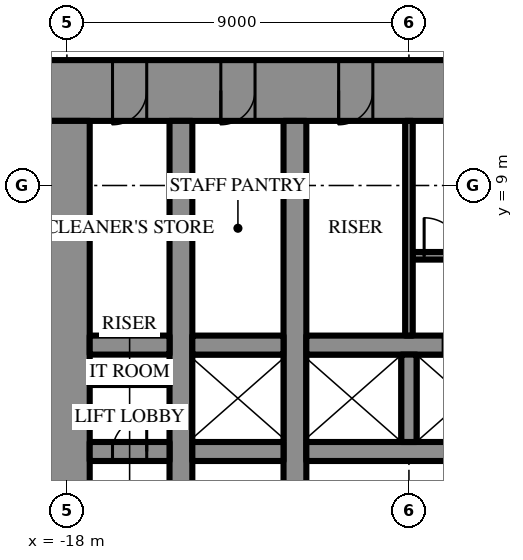
"""IFC4 building model, lengths in metres.
Left out: names, types, materials, properties, quantities, classifications, styles, units other than length and angle.
Written with IfcOpenShell. Run it as: python <this file> out.ifc"""

import sys

from ifc_helpers import new_model, si_unit, direction, frame, frame_2d, origin, place, context, subcontext, project, spatial, rectangle, extrude, element, fill, save


model = new_model("IFC4")
c1 = context("Model", 3, precision=1e-05, world=origin(), true_north=direction((0.0, 1.0)))
c2 = subcontext(c1, "Body", "Model", "MODEL_VIEW")
j1 = project(units=[si_unit("LENGTHUNIT", "METRE"), si_unit("PLANEANGLEUNIT", "RADIAN")], contexts=[c1])
p1 = place(None, origin())
s1 = spatial("IfcSite", under=j1, at=p1, CompositionType="ELEMENT")
p2 = place(p1, origin())
s2 = spatial("IfcBuilding", under=s1, at=p2, CompositionType="ELEMENT")
p3 = place(p2, frame((0.0, 0.0, 178.3)))
s3 = spatial("IfcBuildingStorey", under=s2, at=p3, CompositionType="ELEMENT", Elevation=178.3)
p4 = place(p3, frame((-18.6, 11.5, 0.0), z_axis=(0.0, 0.0, 1.0), x_axis=(1.0, 0.0, 0.0)))
e1 = element("IfcWall", 1, at=p4, inside=s3, PredefinedType="SHEAR", context=c2, shape_type="SweptSolid", body=[
    extrude(rectangle(XDim=37.2, YDim=1.6, at=frame_2d((18.6, 0.0))), origin(), (0.0, 0.0, 1.0), 4.2),
])
p5 = place(p4, frame((19.45, 0.0, 0.0)))
e2 = element("IfcOpeningElement", 2, at=p5, cuts=e1, PredefinedType="OPENING", context=c2, shape_type="SweptSolid", body=[
    extrude(rectangle(XDim=0.9, YDim=2.2, at=frame_2d((0.45, 1.1))), frame((0.0, 0.81, 0.0), z_axis=(0.0, -1.0, 0.0), x_axis=(1.0, 0.0, 0.0)), (0.0, 0.0, 1.0), 1.62),
])
p6 = place(p4, frame((22.45, 0.0, 0.0)))
e3 = element("IfcOpeningElement", 3, at=p6, cuts=e1, PredefinedType="OPENING", context=c2, shape_type="SweptSolid", body=[
    extrude(rectangle(XDim=0.9, YDim=2.2, at=frame_2d((0.45, 1.1))), frame((0.0, 0.81, 0.0), z_axis=(0.0, -1.0, 0.0), x_axis=(1.0, 0.0, 0.0)), (0.0, 0.0, 1.0), 1.62),
])
p7 = place(p4, frame((25.5, 0.0, 0.0)))
e4 = element("IfcOpeningElement", 4, at=p7, cuts=e1, PredefinedType="OPENING", context=c2, shape_type="SweptSolid", body=[
    extrude(rectangle(XDim=1.0, YDim=2.2, at=frame_2d((0.5, 1.1))), frame((0.0, 0.81, 0.0), z_axis=(0.0, -1.0, 0.0), x_axis=(1.0, 0.0, 0.0)), (0.0, 0.0, 1.0), 1.62),
])
p8 = place(p4, frame((1.8, 0.0, 0.0)))
e5 = element("IfcOpeningElement", 5, at=p8, cuts=e1, PredefinedType="OPENING", context=c2, shape_type="SweptSolid", body=[
    extrude(rectangle(XDim=0.9, YDim=2.2, at=frame_2d((0.45, 1.1))), frame((0.0, 0.81, 0.0), z_axis=(0.0, -1.0, 0.0), x_axis=(1.0, 0.0, 0.0)), (0.0, 0.0, 1.0), 1.62),
])
p9 = place(p4, frame((4.65, 0.0, 0.0)))
e6 = element("IfcOpeningElement", 6, at=p9, cuts=e1, PredefinedType="OPENING", context=c2, shape_type="SweptSolid", body=[
    extrude(rectangle(XDim=0.9, YDim=2.2, at=frame_2d((0.45, 1.1))), frame((0.0, 0.81, 0.0), z_axis=(0.0, -1.0, 0.0), x_axis=(1.0, 0.0, 0.0)), (0.0, 0.0, 1.0), 1.62),
])
p10 = place(p4, frame((7.75, 0.0, 0.0)))
e7 = element("IfcOpeningElement", 7, at=p10, cuts=e1, PredefinedType="OPENING", context=c2, shape_type="SweptSolid", body=[
    extrude(rectangle(XDim=0.9, YDim=2.2, at=frame_2d((0.45, 1.1))), frame((0.0, 0.81, 0.0), z_axis=(0.0, -1.0, 0.0), x_axis=(1.0, 0.0, 0.0)), (0.0, 0.0, 1.0), 1.62),
])
p11 = place(p4, frame((28.55, 0.0, 0.0)))
e8 = element("IfcOpeningElement", 8, at=p11, cuts=e1, PredefinedType="OPENING", context=c2, shape_type="SweptSolid", body=[
    extrude(rectangle(XDim=0.9, YDim=2.2, at=frame_2d((0.45, 1.1))), frame((0.0, 0.81, 0.0), z_axis=(0.0, -1.0, 0.0), x_axis=(1.0, 0.0, 0.0)), (0.0, 0.0, 1.0), 1.62),
])
p12 = place(p4, frame((31.65, 0.0, 0.0)))
e9 = element("IfcOpeningElement", 9, at=p12, cuts=e1, PredefinedType="OPENING", context=c2, shape_type="SweptSolid", body=[
    extrude(rectangle(XDim=0.9, YDim=2.2, at=frame_2d((0.45, 1.1))), frame((0.0, 0.81, 0.0), z_axis=(0.0, -1.0, 0.0), x_axis=(1.0, 0.0, 0.0)), (0.0, 0.0, 1.0), 1.62),
])
p13 = place(p4, frame((34.5, 0.0, 0.0)))
e10 = element("IfcOpeningElement", 10, at=p13, cuts=e1, PredefinedType="OPENING", context=c2, shape_type="SweptSolid", body=[
    extrude(rectangle(XDim=0.9, YDim=2.2, at=frame_2d((0.45, 1.1))), frame((0.0, 0.81, 0.0), z_axis=(0.0, -1.0, 0.0), x_axis=(1.0, 0.0, 0.0)), (0.0, 0.0, 1.0), 1.62),
])
p14 = place(p3, frame((-18.0, 10.7, 0.0), z_axis=(0.0, 0.0, 1.0), x_axis=(0.0, -1.0, 0.0)))
e11 = element("IfcWall", 11, at=p14, inside=s3, PredefinedType="SHEAR", context=c2, shape_type="SweptSolid", body=[
    extrude(rectangle(XDim=21.4, YDim=1.2, at=frame_2d((10.7, 0.0))), origin(), (0.0, 0.0, 1.0), 4.2),
])
p15 = place(p14, frame((9.8, 0.0, 0.0)))
e12 = element("IfcOpeningElement", 12, at=p15, cuts=e11, PredefinedType="OPENING", context=c2, shape_type="SweptSolid", body=[
    extrude(rectangle(XDim=1.8, YDim=2.4, at=frame_2d((0.9, 1.2))), frame((0.0, 0.61, 0.0), z_axis=(0.0, -1.0, 0.0), x_axis=(1.0, 0.0, 0.0)), (0.0, 0.0, 1.0), 1.22),
])
p16 = place(p3, frame((-12.0, -10.7, 0.0), z_axis=(0.0, 0.0, 1.0), x_axis=(0.0, 1.0, 0.0)))
e13 = element("IfcWall", 13, at=p16, inside=s3, PredefinedType="SHEAR", context=c2, shape_type="SweptSolid", body=[
    extrude(rectangle(XDim=21.4, YDim=0.6, at=frame_2d((10.7, 0.0))), origin(), (0.0, 0.0, 1.0), 4.2),
])
p17 = place(p16, frame((9.8, 0.0, 0.0)))
e14 = element("IfcOpeningElement", 14, at=p17, cuts=e13, PredefinedType="OPENING", context=c2, shape_type="SweptSolid", body=[
    extrude(rectangle(XDim=1.8, YDim=2.4, at=frame_2d((0.9, 1.2))), frame((0.0, 0.31, 0.0), z_axis=(0.0, -1.0, 0.0), x_axis=(1.0, 0.0, 0.0)), (0.0, 0.0, 1.0), 0.62),
])
p18 = place(p3, frame((-15.0, -10.7, 0.0), z_axis=(0.0, 0.0, 1.0), x_axis=(0.0, 1.0, 0.0)))
e15 = element("IfcWall", 15, at=p18, inside=s3, PredefinedType="SHEAR", context=c2, shape_type="SweptSolid", body=[
    extrude(rectangle(XDim=21.4, YDim=0.6, at=frame_2d((10.7, 0.0))), origin(), (0.0, 0.0, 1.0), 4.2),
])
p19 = place(p18, frame((9.8, 0.0, 0.0)))
e16 = element("IfcOpeningElement", 16, at=p19, cuts=e15, PredefinedType="OPENING", context=c2, shape_type="SweptSolid", body=[
    extrude(rectangle(XDim=1.8, YDim=2.4, at=frame_2d((0.9, 1.2))), frame((0.0, 0.31, 0.0), z_axis=(0.0, -1.0, 0.0), x_axis=(1.0, 0.0, 0.0)), (0.0, 0.0, 1.0), 0.62),
])
p20 = place(p3, frame((-17.4, 2.0, 0.0), z_axis=(0.0, 0.0, 1.0), x_axis=(1.0, 0.0, 0.0)))
e17 = element("IfcWall", 17, at=p20, inside=s3, PredefinedType="SHEAR", context=c2, shape_type="SweptSolid", body=[
    extrude(rectangle(XDim=2.1, YDim=0.5, at=frame_2d((1.05, 0.0))), origin(), (0.0, 0.0, 1.0), 4.2),
])
p21 = place(p20, frame((0.6, 0.0, 0.0)))
e18 = element("IfcOpeningElement", 18, at=p21, cuts=e17, PredefinedType="OPENING", context=c2, shape_type="SweptSolid", body=[
    extrude(rectangle(XDim=0.9, YDim=2.2, at=frame_2d((0.45, 1.1))), frame((0.0, 0.26, 0.0), z_axis=(0.0, -1.0, 0.0), x_axis=(1.0, 0.0, 0.0)), (0.0, 0.0, 1.0), 0.52),
])
p22 = place(p3, frame((-14.7, 2.0, 0.0), z_axis=(0.0, 0.0, 1.0), x_axis=(1.0, 0.0, 0.0)))
e19 = element("IfcWall", 19, at=p22, inside=s3, PredefinedType="SHEAR", context=c2, shape_type="SweptSolid", body=[
    extrude(rectangle(XDim=2.4, YDim=0.5, at=frame_2d((1.2, 0.0))), origin(), (0.0, 0.0, 1.0), 4.2),
])
p23 = place(p3, frame((-11.7, 2.0, 0.0), z_axis=(0.0, 0.0, 1.0), x_axis=(1.0, 0.0, 0.0)))
e20 = element("IfcWall", 20, at=p23, inside=s3, PredefinedType="SHEAR", context=c2, shape_type="SweptSolid", body=[
    extrude(rectangle(XDim=5.9, YDim=0.5, at=frame_2d((2.95, 0.0))), origin(), (0.0, 0.0, 1.0), 4.2),
])
p24 = place(p3, frame((-17.4, 4.8, 0.0), z_axis=(0.0, 0.0, 1.0), x_axis=(1.0, 0.0, 0.0)))
e21 = element("IfcWall", 21, at=p24, inside=s3, PredefinedType="SHEAR", context=c2, shape_type="SweptSolid", body=[
    extrude(rectangle(XDim=2.1, YDim=0.5, at=frame_2d((1.05, 0.0))), origin(), (0.0, 0.0, 1.0), 4.2),
])
p25 = place(p3, frame((-14.7, 4.8, 0.0), z_axis=(0.0, 0.0, 1.0), x_axis=(1.0, 0.0, 0.0)))
e22 = element("IfcWall", 22, at=p25, inside=s3, PredefinedType="SHEAR", context=c2, shape_type="SweptSolid", body=[
    extrude(rectangle(XDim=2.4, YDim=0.5, at=frame_2d((1.2, 0.0))), origin(), (0.0, 0.0, 1.0), 4.2),
])
p26 = place(p3, frame((-11.7, 4.8, 0.0), z_axis=(0.0, 0.0, 1.0), x_axis=(1.0, 0.0, 0.0)))
e23 = element("IfcWall", 23, at=p26, inside=s3, PredefinedType="SHEAR", context=c2, shape_type="SweptSolid", body=[
    extrude(rectangle(XDim=23.4, YDim=0.5, at=frame_2d((11.7, 0.0))), origin(), (0.0, 0.0, 1.0), 4.2),
])
p27 = place(p26, frame((6.6, 0.0, 0.0)))
e24 = element("IfcOpeningElement", 24, at=p27, cuts=e23, PredefinedType="OPENING", context=c2, shape_type="SweptSolid", body=[
    extrude(rectangle(XDim=1.2, YDim=2.2, at=frame_2d((0.6, 1.1))), frame((0.0, 0.26, 0.0), z_axis=(0.0, -1.0, 0.0), x_axis=(1.0, 0.0, 0.0)), (0.0, 0.0, 1.0), 0.52),
])
p28 = place(p26, frame((3.6, 0.0, 0.0)))
e25 = element("IfcOpeningElement", 25, at=p28, cuts=e23, PredefinedType="OPENING", context=c2, shape_type="SweptSolid", body=[
    extrude(rectangle(XDim=1.2, YDim=2.2, at=frame_2d((0.6, 1.1))), frame((0.0, 0.26, 0.0), z_axis=(0.0, -1.0, 0.0), x_axis=(1.0, 0.0, 0.0)), (0.0, 0.0, 1.0), 0.52),
])
p29 = place(p3, frame((-9.0, 2.25, 0.0), z_axis=(0.0, 0.0, 1.0), x_axis=(0.0, 1.0, 0.0)))
e26 = element("IfcWall", 26, at=p29, inside=s3, PredefinedType="SHEAR", context=c2, shape_type="SweptSolid", body=[
    extrude(rectangle(XDim=2.3, YDim=0.4, at=frame_2d((1.15, 0.0))), origin(), (0.0, 0.0, 1.0), 4.2),
])
p30 = place(p3, frame((-8.9, 7.15, 0.0), z_axis=(0.0, 0.0, 1.0), x_axis=(1.0, 0.0, 0.0)))
e27 = element("IfcWall", 27, at=p30, inside=s3, PredefinedType="SHEAR", context=c2, shape_type="SweptSolid", body=[
    extrude(rectangle(XDim=8.6, YDim=0.2, at=frame_2d((4.3, 0.0))), origin(), (0.0, 0.0, 1.0), 4.2),
])
p31 = place(p30, frame((0.3, 0.0, 0.0)))
e28 = element("IfcOpeningElement", 28, at=p31, cuts=e27, PredefinedType="OPENING", context=c2, shape_type="SweptSolid", body=[
    extrude(rectangle(XDim=1.0, YDim=2.2, at=frame_2d((0.5, 1.1))), frame((0.0, 0.11, 0.0), z_axis=(0.0, -1.0, 0.0), x_axis=(1.0, 0.0, 0.0)), (0.0, 0.0, 1.0), 0.22),
])
p32 = place(p3, frame((-9.0, 5.05, 0.0), z_axis=(0.0, 0.0, 1.0), x_axis=(0.0, 1.0, 0.0)))
e29 = element("IfcWall", 29, at=p32, inside=s3, PredefinedType="PARTITIONING", context=c2, shape_type="SweptSolid", body=[
    extrude(rectangle(XDim=5.65, YDim=0.2, at=frame_2d((2.825, 0.0))), origin(), (0.0, 0.0, 1.0), 4.0),
])
p33 = place(p3, frame((-17.4, 3.85, 0.0), z_axis=(0.0, 0.0, 1.0), x_axis=(1.0, 0.0, 0.0)))
e30 = element("IfcWall", 30, at=p33, inside=s3, PredefinedType="PARTITIONING", context=c2, shape_type="SweptSolid", body=[
    extrude(rectangle(XDim=2.1, YDim=0.2, at=frame_2d((1.05, 0.0))), origin(), (0.0, 0.0, 1.0), 4.0),
])
p34 = place(p31, origin())
e31 = element("IfcDoor", 31, at=p34, inside=s3, OperationType="SINGLE_SWING_RIGHT", PredefinedType="DOOR", context=c2, shape_type="SweptSolid", body=[
    extrude(rectangle(XDim=1.0, YDim=2.2, at=frame_2d((0.5, 1.1))), frame((0.0, 0.025, 0.0), z_axis=(0.0, -1.0, 0.0), x_axis=(1.0, 0.0, 0.0)), (0.0, 0.0, 1.0), 0.05),
])
fill(e28, e31)
p35 = place(p8, frame((0.9, 0.0, 0.0), z_axis=(0.0, 0.0, 1.0), x_axis=(-1.0, 0.0, 0.0)))
e32 = element("IfcDoor", 32, at=p35, inside=s3, OperationType="SINGLE_SWING_LEFT", PredefinedType="DOOR", context=c2, shape_type="SweptSolid", body=[
    extrude(rectangle(XDim=0.9, YDim=2.2, at=frame_2d((0.45, 1.1))), frame((0.0, 0.025, 0.0), z_axis=(0.0, -1.0, 0.0), x_axis=(1.0, 0.0, 0.0)), (0.0, 0.0, 1.0), 0.05),
])
fill(e5, e32)
p36 = place(p9, frame((0.9, 0.0, 0.0), z_axis=(0.0, 0.0, 1.0), x_axis=(-1.0, 0.0, 0.0)))
e33 = element("IfcDoor", 33, at=p36, inside=s3, OperationType="SINGLE_SWING_LEFT", PredefinedType="DOOR", context=c2, shape_type="SweptSolid", body=[
    extrude(rectangle(XDim=0.9, YDim=2.2, at=frame_2d((0.45, 1.1))), frame((0.0, 0.025, 0.0), z_axis=(0.0, -1.0, 0.0), x_axis=(1.0, 0.0, 0.0)), (0.0, 0.0, 1.0), 0.05),
])
fill(e6, e33)
p37 = place(p10, frame((0.9, 0.0, 0.0), z_axis=(0.0, 0.0, 1.0), x_axis=(-1.0, 0.0, 0.0)))
e34 = element("IfcDoor", 34, at=p37, inside=s3, OperationType="SINGLE_SWING_LEFT", PredefinedType="DOOR", context=c2, shape_type="SweptSolid", body=[
    extrude(rectangle(XDim=0.9, YDim=2.2, at=frame_2d((0.45, 1.1))), frame((0.0, 0.025, 0.0), z_axis=(0.0, -1.0, 0.0), x_axis=(1.0, 0.0, 0.0)), (0.0, 0.0, 1.0), 0.05),
])
fill(e7, e34)
p38 = place(p21, origin())
e35 = element("IfcDoor", 35, at=p38, inside=s3, OperationType="SINGLE_SWING_LEFT", PredefinedType="DOOR", context=c2, shape_type="SweptSolid", body=[
    extrude(rectangle(XDim=0.9, YDim=2.2, at=frame_2d((0.45, 1.1))), frame((0.0, 0.025, 0.0), z_axis=(0.0, -1.0, 0.0), x_axis=(1.0, 0.0, 0.0)), (0.0, 0.0, 1.0), 0.05),
])
fill(e18, e35)
save(model, sys.argv[1])
